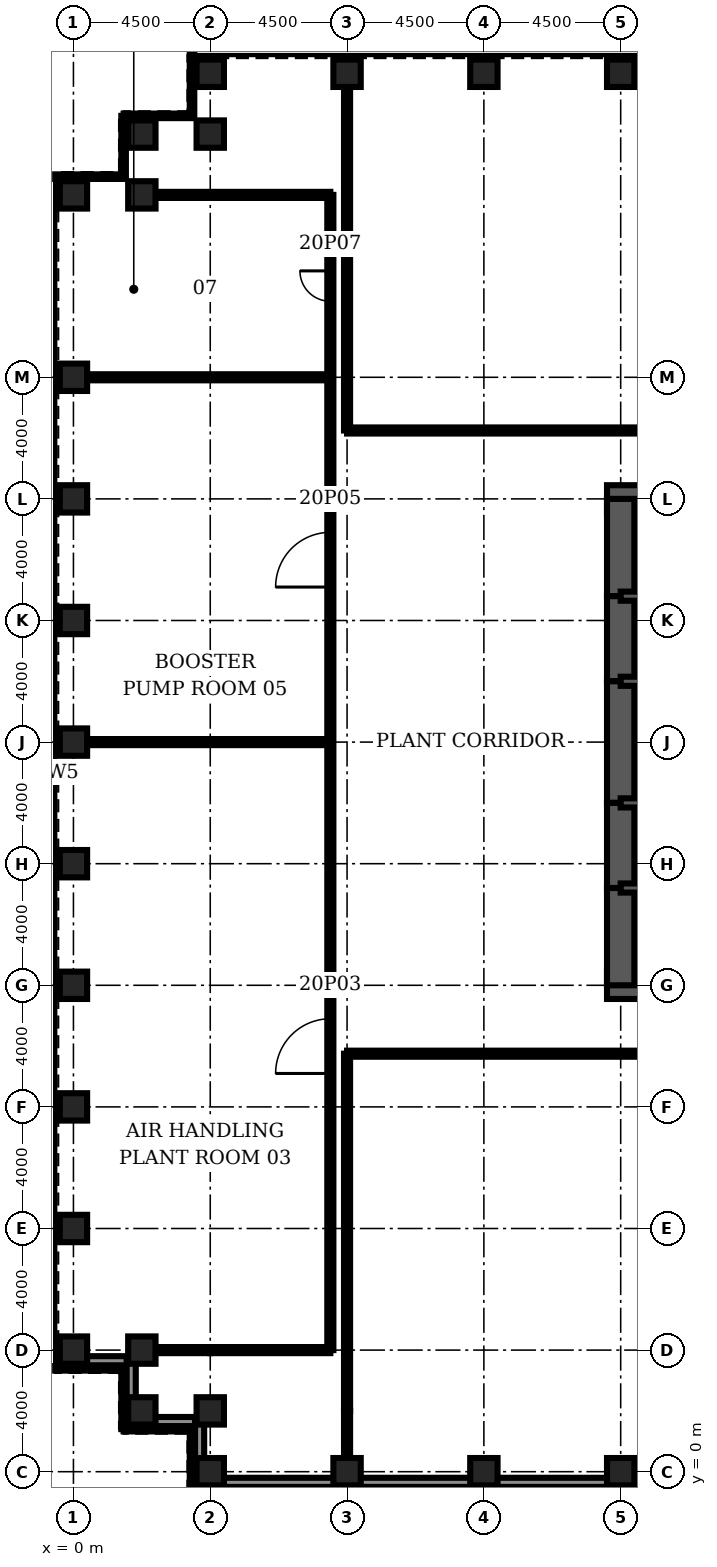
"""IFC4 building model, lengths in metres.
Left out: names, types, materials, properties, quantities, classifications, styles, units other than length and angle.
Written with IfcOpenShell. Run it as: python <this file> out.ifc"""

import sys

from ifc_helpers import new_model, si_unit, direction, frame, frame_2d, origin, origin_2d, place, context, subcontext, project, spatial, rectangle, hollow_rectangle, extrude, element, fill, save


model = new_model("IFC4")
c1 = context("Model", 3, precision=1e-05, world=origin(), true_north=direction((0.0, 1.0)))
c2 = subcontext(c1, "Body", "Model", "MODEL_VIEW")
j1 = project(units=[si_unit("LENGTHUNIT", "METRE"), si_unit("PLANEANGLEUNIT", "RADIAN")], contexts=[c1])
p1 = place(None, origin())
s1 = spatial("IfcSite", under=j1, at=p1, CompositionType="ELEMENT")
p2 = place(p1, origin())
s2 = spatial("IfcBuilding", under=s1, at=p2, CompositionType="ELEMENT")
p3 = place(p2, frame((0.0, 0.0, 95.0)))
s3 = spatial("IfcBuildingStorey", under=s2, at=p3, CompositionType="ELEMENT", Elevation=95.0)
for number, where, z_axis, x_axis in (
    (1, (4.5, 0.056, 0.155), (0.0, 0.342, 0.94), (0.0, -0.94, 0.342)),
    (2, (9.0, 0.056, 0.155), (0.0, 0.342, 0.94), (0.0, -0.94, 0.342)),
    (3, (13.5, 0.056, 0.155), (0.0, 0.342, 0.94), (0.0, -0.94, 0.342)),
    (4, (18.0, 0.056, 0.155), (0.0, 0.342, 0.94), (0.0, -0.94, 0.342)),
):
    element("IfcColumn", number, at=place(p3, frame(where, z_axis=z_axis, x_axis=x_axis)), inside=s3, PredefinedType="USERDEFINED", context=c2, shape_type="SweptSolid", body=[
        extrude(hollow_rectangle(XDim=0.9, YDim=0.9, WallThickness=0.11, at=origin_2d()), origin(), (0.0, 0.0, 1.0), 5.522),
    ])
for number, where, z_axis, x_axis in (
    (5, (18.0, 46.0, 0.0), (0.0, 0.0, 1.0), (0.0, 1.0, 0.0)),
    (6, (13.5, 46.0, 0.0), (0.0, 0.0, 1.0), (0.0, 1.0, 0.0)),
    (7, (9.0, 46.0, 0.0), (0.0, 0.0, 1.0), (0.0, 1.0, 0.0)),
    (8, (4.5, 46.0, 0.0), (0.0, 0.0, 1.0), (0.0, 1.0, 0.0)),
    (9, (4.5, 44.0, 0.0), (0.0, 0.0, 1.0), (0.0, 1.0, 0.0)),
    (10, (2.25, 44.0, 0.0), (0.0, 0.0, 1.0), (1.0, 0.0, 0.0)),
    (11, (2.25, 42.0, 0.0), (0.0, 0.0, 1.0), (1.0, 0.0, 0.0)),
    (12, (0.0, 42.0, 0.0), (0.0, 0.0, 1.0), (1.0, 0.0, 0.0)),
    (13, (0.0, 36.0, 0.0), (0.0, 0.0, 1.0), (1.0, 0.0, 0.0)),
    (14, (0.0, 32.0, 0.0), (0.0, 0.0, 1.0), (1.0, 0.0, 0.0)),
    (15, (0.0, 28.0, 0.0), (0.0, 0.0, 1.0), (1.0, 0.0, 0.0)),
    (16, (0.0, 24.0, 0.0), (0.0, 0.0, 1.0), (1.0, 0.0, 0.0)),
    (17, (0.0, 20.0, 0.0), (0.0, 0.0, 1.0), (1.0, 0.0, 0.0)),
    (18, (0.0, 16.0, 0.0), (0.0, 0.0, 1.0), (1.0, 0.0, 0.0)),
    (19, (0.0, 12.0, 0.0), (0.0, 0.0, 1.0), (1.0, 0.0, 0.0)),
    (20, (0.0, 8.0, 0.0), (0.0, 0.0, 1.0), (1.0, 0.0, 0.0)),
):
    element("IfcColumn", number, at=place(p3, frame(where, z_axis=z_axis, x_axis=x_axis)), inside=s3, PredefinedType="COLUMN", context=c2, shape_type="SweptSolid", body=[
        extrude(hollow_rectangle(XDim=0.9, YDim=0.9, WallThickness=0.11, at=origin_2d()), origin(), (0.0, 0.0, 1.0), 5.5),
    ])
for number, where, z_axis, x_axis in (
    (21, (0.0, 4.056, 0.155), (0.0, 0.342, 0.94), (-1.0, 0.0, 0.0)),
    (22, (2.25, 4.056, 0.155), (0.0, 0.342, 0.94), (-1.0, 0.0, 0.0)),
    (23, (2.25, 2.056, 0.155), (0.0, 0.342, 0.94), (-1.0, 0.0, 0.0)),
    (24, (4.5, 2.056, 0.155), (0.0, 0.342, 0.94), (0.0, -0.94, 0.342)),
):
    element("IfcColumn", number, at=place(p3, frame(where, z_axis=z_axis, x_axis=x_axis)), inside=s3, PredefinedType="USERDEFINED", context=c2, shape_type="SweptSolid", body=[
        extrude(hollow_rectangle(XDim=0.9, YDim=0.9, WallThickness=0.11, at=origin_2d()), origin(), (0.0, 0.0, 1.0), 5.522),
    ])
for number, where, z_axis, x_axis in (
    (25, (17.55, 16.0, 0.0), (0.0, 0.0, 1.0), (1.0, 0.0, 0.0)),
    (26, (27.0, 32.0, 0.0), (0.0, 0.0, 1.0), (-1.0, 0.0, 0.0)),
):
    element("IfcWall", number, at=place(p3, frame(where, z_axis=z_axis, x_axis=x_axis)), inside=s3, PredefinedType="SHEAR", context=c2, shape_type="SweptSolid", body=[
        extrude(rectangle(XDim=9.45, YDim=0.9, at=frame_2d((4.725, 0.0))), origin(), (0.0, 0.0, 1.0), 5.5),
    ])
p4 = place(p3, frame((18.0, 32.0, 0.0), z_axis=(0.0, 0.0, 1.0), x_axis=(0.0, -1.0, 0.0)))
e27 = element("IfcWall", 27, at=p4, inside=s3, PredefinedType="SHEAR", context=c2, shape_type="SweptSolid", body=[
    extrude(rectangle(XDim=3.2, YDim=0.9, at=frame_2d((1.6, 0.0))), origin(), (0.0, 0.0, 1.0), 5.5),
])
p5 = place(p3, frame((18.0, 28.8, 0.0), z_axis=(0.0, 0.0, 1.0), x_axis=(0.0, -1.0, 0.0)))
e28 = element("IfcWall", 28, at=p5, inside=s3, PredefinedType="SHEAR", context=c2, shape_type="SweptSolid", body=[
    extrude(rectangle(XDim=2.8, YDim=0.9, at=frame_2d((1.4, 0.0))), origin(), (0.0, 0.0, 1.0), 5.5),
])
p6 = place(p5, frame((0.4, 0.0, 0.0)))
e29 = element("IfcOpeningElement", 29, at=p6, cuts=e28, PredefinedType="OPENING", context=c2, shape_type="SweptSolid", body=[
    extrude(rectangle(XDim=1.8, YDim=2.1, at=frame_2d((0.9, 1.05))), frame((0.0, 0.46, 0.0), z_axis=(0.0, -1.0, 0.0), x_axis=(1.0, 0.0, 0.0)), (0.0, 0.0, 1.0), 0.92),
])
p7 = place(p3, frame((18.0, 26.0, 0.0), z_axis=(0.0, 0.0, 1.0), x_axis=(0.0, -1.0, 0.0)))
e30 = element("IfcWall", 30, at=p7, inside=s3, PredefinedType="SHEAR", context=c2, shape_type="SweptSolid", body=[
    extrude(rectangle(XDim=4.0, YDim=0.9, at=frame_2d((2.0, 0.0))), origin(), (0.0, 0.0, 1.0), 5.5),
])
p8 = place(p3, frame((18.0, 22.0, 0.0), z_axis=(0.0, 0.0, 1.0), x_axis=(0.0, -1.0, 0.0)))
e31 = element("IfcWall", 31, at=p8, inside=s3, PredefinedType="SHEAR", context=c2, shape_type="SweptSolid", body=[
    extrude(rectangle(XDim=2.8, YDim=0.9, at=frame_2d((1.4, 0.0))), origin(), (0.0, 0.0, 1.0), 5.5),
])
p9 = place(p8, frame((0.6, 0.0, 0.0)))
e32 = element("IfcOpeningElement", 32, at=p9, cuts=e31, PredefinedType="OPENING", context=c2, shape_type="SweptSolid", body=[
    extrude(rectangle(XDim=1.8, YDim=2.1, at=frame_2d((0.9, 1.05))), frame((0.0, 0.46, 0.0), z_axis=(0.0, -1.0, 0.0), x_axis=(1.0, 0.0, 0.0)), (0.0, 0.0, 1.0), 0.92),
])
p10 = place(p3, frame((18.0, 19.2, 0.0), z_axis=(0.0, 0.0, 1.0), x_axis=(0.0, -1.0, 0.0)))
e33 = element("IfcWall", 33, at=p10, inside=s3, PredefinedType="SHEAR", context=c2, shape_type="SweptSolid", body=[
    extrude(rectangle(XDim=3.2, YDim=0.9, at=frame_2d((1.6, 0.0))), origin(), (0.0, 0.0, 1.0), 5.5),
])
p11 = place(p3, frame((18.0, 19.2, 0.0), z_axis=(0.0, 0.0, 1.0), x_axis=(1.0, 0.0, 0.0)))
e34 = element("IfcWall", 34, at=p11, inside=s3, PredefinedType="SOLIDWALL", context=c2, shape_type="SweptSolid", body=[
    extrude(rectangle(XDim=9.0, YDim=0.3, at=frame_2d((4.5, 0.0))), origin(), (0.0, 0.0, 1.0), 5.5),
])
p12 = place(p11, frame((0.65, 0.0, 0.0)))
e35 = element("IfcOpeningElement", 35, at=p12, cuts=e34, PredefinedType="OPENING", context=c2, shape_type="SweptSolid", body=[
    extrude(rectangle(XDim=1.0, YDim=2.1, at=frame_2d((0.5, 1.05))), frame((0.0, 0.16, 0.0), z_axis=(0.0, -1.0, 0.0), x_axis=(1.0, 0.0, 0.0)), (0.0, 0.0, 1.0), 0.32),
])
p13 = place(p3, frame((18.0, 28.8, 0.0), z_axis=(0.0, 0.0, 1.0), x_axis=(1.0, 0.0, 0.0)))
e36 = element("IfcWall", 36, at=p13, inside=s3, PredefinedType="SOLIDWALL", context=c2, shape_type="SweptSolid", body=[
    extrude(rectangle(XDim=9.0, YDim=0.3, at=frame_2d((4.5, 0.0))), origin(), (0.0, 0.0, 1.0), 5.5),
])
p14 = place(p13, frame((0.65, 0.0, 0.0)))
e37 = element("IfcOpeningElement", 37, at=p14, cuts=e36, PredefinedType="OPENING", context=c2, shape_type="SweptSolid", body=[
    extrude(rectangle(XDim=1.0, YDim=2.1, at=frame_2d((0.5, 1.05))), frame((0.0, 0.16, 0.0), z_axis=(0.0, -1.0, 0.0), x_axis=(1.0, 0.0, 0.0)), (0.0, 0.0, 1.0), 0.32),
])
p15 = place(p3, frame((18.0, 22.0, 0.0), z_axis=(0.0, 0.0, 1.0), x_axis=(1.0, 0.0, 0.0)))
e38 = element("IfcWall", 38, at=p15, inside=s3, PredefinedType="SOLIDWALL", context=c2, shape_type="SweptSolid", body=[
    extrude(rectangle(XDim=6.0, YDim=0.3, at=frame_2d((3.0, 0.0))), origin(), (0.0, 0.0, 1.0), 5.5),
])
p16 = place(p15, frame((2.0, 0.0, 0.0)))
e39 = element("IfcOpeningElement", 39, at=p16, cuts=e38, PredefinedType="OPENING", context=c2, shape_type="SweptSolid", body=[
    extrude(rectangle(XDim=1.0, YDim=2.1, at=frame_2d((0.5, 1.05))), frame((0.0, 0.16, 0.0), z_axis=(0.0, -1.0, 0.0), x_axis=(1.0, 0.0, 0.0)), (0.0, 0.0, 1.0), 0.32),
])
p17 = place(p3, frame((18.0, 26.0, 0.0), z_axis=(0.0, 0.0, 1.0), x_axis=(1.0, 0.0, 0.0)))
e40 = element("IfcWall", 40, at=p17, inside=s3, PredefinedType="SOLIDWALL", context=c2, shape_type="SweptSolid", body=[
    extrude(rectangle(XDim=6.0, YDim=0.3, at=frame_2d((3.0, 0.0))), origin(), (0.0, 0.0, 1.0), 5.5),
])
p18 = place(p3, frame((2.7, 4.0, 0.0), z_axis=(0.0, 0.0, 1.0), x_axis=(1.0, 0.0, 0.0)))
e41 = element("IfcWall", 41, at=p18, inside=s3, PredefinedType="PARTITIONING", context=c2, shape_type="SweptSolid", body=[
    extrude(rectangle(XDim=1.8, YDim=0.2, at=frame_2d((0.9, 0.0))), origin(), (0.0, 0.0, 1.0), 4.64),
])
p19 = place(p3, frame((4.5, 4.0, 0.0), z_axis=(0.0, 0.0, 1.0), x_axis=(1.0, 0.0, 0.0)))
e42 = element("IfcWall", 42, at=p19, inside=s3, PredefinedType="PARTITIONING", context=c2, shape_type="SweptSolid", body=[
    extrude(rectangle(XDim=3.95, YDim=0.2, at=frame_2d((1.975, 0.0))), origin(), (0.0, 0.0, 1.0), 5.34),
])
p20 = place(p3, frame((9.0, 13.75, 0.0), z_axis=(0.0, 0.0, 1.0), x_axis=(1.0, 0.0, 0.0)))
e43 = element("IfcWall", 43, at=p20, inside=s3, PredefinedType="PARTITIONING", context=c2, shape_type="SweptSolid", body=[
    extrude(rectangle(XDim=54.0, YDim=0.2, at=frame_2d((27.0, 0.0))), origin(), (0.0, 0.0, 1.0), 5.34),
])
p21 = place(p20, frame((26.1, 0.0, 0.0)))
e44 = element("IfcOpeningElement", 44, at=p21, cuts=e43, PredefinedType="OPENING", context=c2, shape_type="SweptSolid", body=[
    extrude(rectangle(XDim=1.8, YDim=2.1, at=frame_2d((0.9, 1.05))), frame((0.0, 0.11, 0.0), z_axis=(0.0, -1.0, 0.0), x_axis=(1.0, 0.0, 0.0)), (0.0, 0.0, 1.0), 0.22),
])
p22 = place(p3, frame((0.45, 24.0, 0.0), z_axis=(0.0, 0.0, 1.0), x_axis=(1.0, 0.0, 0.0)))
e45 = element("IfcWall", 45, at=p22, inside=s3, PredefinedType="PARTITIONING", context=c2, shape_type="SweptSolid", body=[
    extrude(rectangle(XDim=8.0, YDim=0.2, at=frame_2d((4.0, 0.0))), origin(), (0.0, 0.0, 1.0), 5.34),
])
p23 = place(p3, frame((9.0, 34.25, 0.0), z_axis=(0.0, 0.0, 1.0), x_axis=(1.0, 0.0, 0.0)))
e46 = element("IfcWall", 46, at=p23, inside=s3, PredefinedType="PARTITIONING", context=c2, shape_type="SweptSolid", body=[
    extrude(rectangle(XDim=54.0, YDim=0.2, at=frame_2d((27.0, 0.0))), origin(), (0.0, 0.0, 1.0), 5.34),
])
p24 = place(p23, frame((26.1, 0.0, 0.0)))
e47 = element("IfcOpeningElement", 47, at=p24, cuts=e46, PredefinedType="OPENING", context=c2, shape_type="SweptSolid", body=[
    extrude(rectangle(XDim=1.8, YDim=2.1, at=frame_2d((0.9, 1.05))), frame((0.0, 0.11, 0.0), z_axis=(0.0, -1.0, 0.0), x_axis=(1.0, 0.0, 0.0)), (0.0, 0.0, 1.0), 0.22),
])
p25 = place(p3, frame((0.45, 36.0, 0.0), z_axis=(0.0, 0.0, 1.0), x_axis=(1.0, 0.0, 0.0)))
e48 = element("IfcWall", 48, at=p25, inside=s3, PredefinedType="PARTITIONING", context=c2, shape_type="SweptSolid", body=[
    extrude(rectangle(XDim=8.0, YDim=0.2, at=frame_2d((4.0, 0.0))), origin(), (0.0, 0.0, 1.0), 5.34),
])
p26 = place(p3, frame((2.7, 42.0, 0.0), z_axis=(0.0, 0.0, 1.0), x_axis=(1.0, 0.0, 0.0)))
e49 = element("IfcWall", 49, at=p26, inside=s3, PredefinedType="PARTITIONING", context=c2, shape_type="SweptSolid", body=[
    extrude(rectangle(XDim=5.75, YDim=0.2, at=frame_2d((2.875, 0.0))), origin(), (0.0, 0.0, 1.0), 5.34),
])
p27 = place(p3, frame((8.45, 4.0, 0.0), z_axis=(0.0, 0.0, 1.0), x_axis=(0.0, 1.0, 0.0)))
e50 = element("IfcWall", 50, at=p27, inside=s3, PredefinedType="PARTITIONING", context=c2, shape_type="SweptSolid", body=[
    extrude(rectangle(XDim=38.0, YDim=0.2, at=frame_2d((19.0, 0.0))), origin(), (0.0, 0.0, 1.0), 5.34),
])
p28 = place(p27, frame((9.1, 0.0, 0.0)))
e51 = element("IfcOpeningElement", 51, at=p28, cuts=e50, PredefinedType="OPENING", context=c2, shape_type="SweptSolid", body=[
    extrude(rectangle(XDim=1.8, YDim=2.1, at=frame_2d((0.9, 1.05))), frame((0.0, 0.11, 0.0), z_axis=(0.0, -1.0, 0.0), x_axis=(1.0, 0.0, 0.0)), (0.0, 0.0, 1.0), 0.22),
])
p29 = place(p27, frame((25.1, 0.0, 0.0)))
e52 = element("IfcOpeningElement", 52, at=p29, cuts=e50, PredefinedType="OPENING", context=c2, shape_type="SweptSolid", body=[
    extrude(rectangle(XDim=1.8, YDim=2.1, at=frame_2d((0.9, 1.05))), frame((0.0, 0.11, 0.0), z_axis=(0.0, -1.0, 0.0), x_axis=(1.0, 0.0, 0.0)), (0.0, 0.0, 1.0), 0.22),
])
p30 = place(p27, frame((34.5, 0.0, 0.0)))
e53 = element("IfcOpeningElement", 53, at=p30, cuts=e50, PredefinedType="OPENING", context=c2, shape_type="SweptSolid", body=[
    extrude(rectangle(XDim=1.0, YDim=2.1, at=frame_2d((0.5, 1.05))), frame((0.0, 0.11, 0.0), z_axis=(0.0, -1.0, 0.0), x_axis=(1.0, 0.0, 0.0)), (0.0, 0.0, 1.0), 0.22),
])
p31 = place(p3, frame((9.0, 0.45, 0.0), z_axis=(0.0, 0.0, 1.0), x_axis=(0.0, 1.0, 0.0)))
e54 = element("IfcWall", 54, at=p31, inside=s3, PredefinedType="PARTITIONING", context=c2, shape_type="SweptSolid", body=[
    extrude(rectangle(XDim=1.55, YDim=0.2, at=frame_2d((0.775, 0.0))), origin(), (0.0, 0.0, 1.0), 4.726),
])
p32 = place(p3, frame((9.0, 2.0, 0.0), z_axis=(0.0, 0.0, 1.0), x_axis=(0.0, 1.0, 0.0)))
e55 = element("IfcWall", 55, at=p32, inside=s3, PredefinedType="PARTITIONING", context=c2, shape_type="SweptSolid", body=[
    extrude(rectangle(XDim=11.75, YDim=0.2, at=frame_2d((5.875, 0.0))), origin(), (0.0, 0.0, 1.0), 5.25),
])
p33 = place(p3, frame((9.0, 34.25, 0.0), z_axis=(0.0, 0.0, 1.0), x_axis=(0.0, 1.0, 0.0)))
e56 = element("IfcWall", 56, at=p33, inside=s3, PredefinedType="PARTITIONING", context=c2, shape_type="SweptSolid", body=[
    extrude(rectangle(XDim=11.3, YDim=0.2, at=frame_2d((5.65, 0.0))), origin(), (0.0, 0.0, 1.0), 5.34),
])
p34 = place(p3, frame((3.9, 46.6, 0.0), z_axis=(0.0, 0.0, 1.0), x_axis=(0.0, -1.0, 0.0)))
e57 = element("IfcWall", 57, at=p34, inside=s3, PredefinedType="ELEMENTEDWALL", context=c2, shape_type="SweptSolid", body=[
    extrude(rectangle(XDim=2.0, YDim=0.15, at=frame_2d((1.0, 0.0))), origin(), (0.0, 0.0, 1.0), 5.34),
])
p35 = place(p3, frame((3.9, 44.6, 0.0), z_axis=(0.0, 0.0, 1.0), x_axis=(-1.0, 0.0, 0.0)))
e58 = element("IfcWall", 58, at=p35, inside=s3, PredefinedType="ELEMENTEDWALL", context=c2, shape_type="SweptSolid", body=[
    extrude(rectangle(XDim=2.25, YDim=0.15, at=frame_2d((1.125, 0.0))), origin(), (0.0, 0.0, 1.0), 5.34),
])
p36 = place(p3, frame((1.65, 44.6, 0.0), z_axis=(0.0, 0.0, 1.0), x_axis=(0.0, -1.0, 0.0)))
e59 = element("IfcWall", 59, at=p36, inside=s3, PredefinedType="ELEMENTEDWALL", context=c2, shape_type="SweptSolid", body=[
    extrude(rectangle(XDim=2.0, YDim=0.15, at=frame_2d((1.0, 0.0))), origin(), (0.0, 0.0, 1.0), 5.34),
])
for number, where, z_axis, x_axis in (
    (60, (1.65, 42.6, 0.0), (0.0, 0.0, 1.0), (-1.0, 0.0, 0.0)),
    (61, (-0.6, 3.4, 0.0), (0.0, 0.0, 1.0), (1.0, 0.0, 0.0)),
):
    element("IfcWall", number, at=place(p3, frame(where, z_axis=z_axis, x_axis=x_axis)), inside=s3, PredefinedType="ELEMENTEDWALL", context=c2, shape_type="SweptSolid", body=[
        extrude(rectangle(XDim=2.25, YDim=0.15, at=frame_2d((1.125, 0.0))), origin(), (0.0, 0.0, 1.0), 5.34),
    ])
p37 = place(p3, frame((1.65, 3.4, 0.0), z_axis=(0.0, 0.0, 1.0), x_axis=(0.0, -1.0, 0.0)))
e62 = element("IfcWall", 62, at=p37, inside=s3, PredefinedType="ELEMENTEDWALL", context=c2, shape_type="SweptSolid", body=[
    extrude(rectangle(XDim=2.0, YDim=0.15, at=frame_2d((1.0, 0.0))), origin(), (0.0, 0.0, 1.0), 5.34),
])
p38 = place(p3, frame((1.65, 1.4, 0.0), z_axis=(0.0, 0.0, 1.0), x_axis=(1.0, 0.0, 0.0)))
e63 = element("IfcWall", 63, at=p38, inside=s3, PredefinedType="ELEMENTEDWALL", context=c2, shape_type="SweptSolid", body=[
    extrude(rectangle(XDim=2.25, YDim=0.15, at=frame_2d((1.125, 0.0))), origin(), (0.0, 0.0, 1.0), 5.34),
])
p39 = place(p3, frame((3.9, 1.4, 0.0), z_axis=(0.0, 0.0, 1.0), x_axis=(0.0, -1.0, 0.0)))
e64 = element("IfcWall", 64, at=p39, inside=s3, PredefinedType="ELEMENTEDWALL", context=c2, shape_type="SweptSolid", body=[
    extrude(rectangle(XDim=2.0, YDim=0.15, at=frame_2d((1.0, 0.0))), origin(), (0.0, 0.0, 1.0), 5.34),
])
p40 = place(p3, frame((4.15, -0.35, 5.5), z_axis=(0.0, 0.0, 1.0), x_axis=(1.0, 0.0, 0.0)))
e65 = element("IfcWall", 65, at=p40, inside=s3, PredefinedType="PARAPET", context=c2, shape_type="SweptSolid", body=[
    extrude(rectangle(XDim=63.7, YDim=0.3, at=frame_2d((31.85, 0.0))), origin(), (0.0, 0.0, 1.0), 1.1),
])
p41 = place(p3, frame((-0.35, 3.65, 5.5), z_axis=(0.0, 0.0, 1.0), x_axis=(1.0, 0.0, 0.0)))
e66 = element("IfcWall", 66, at=p41, inside=s3, PredefinedType="PARAPET", context=c2, shape_type="SweptSolid", body=[
    extrude(rectangle(XDim=2.25, YDim=0.3, at=frame_2d((1.125, 0.0))), origin(), (0.0, 0.0, 1.0), 1.1),
])
p42 = place(p3, frame((1.9, 3.65, 5.5), z_axis=(0.0, 0.0, 1.0), x_axis=(0.0, -1.0, 0.0)))
e67 = element("IfcWall", 67, at=p42, inside=s3, PredefinedType="PARAPET", context=c2, shape_type="SweptSolid", body=[
    extrude(rectangle(XDim=2.0, YDim=0.3, at=frame_2d((1.0, 0.0))), origin(), (0.0, 0.0, 1.0), 1.1),
])
p43 = place(p3, frame((1.9, 1.65, 5.5), z_axis=(0.0, 0.0, 1.0), x_axis=(1.0, 0.0, 0.0)))
e68 = element("IfcWall", 68, at=p43, inside=s3, PredefinedType="PARAPET", context=c2, shape_type="SweptSolid", body=[
    extrude(rectangle(XDim=2.25, YDim=0.3, at=frame_2d((1.125, 0.0))), origin(), (0.0, 0.0, 1.0), 1.1),
])
p44 = place(p3, frame((4.15, 1.65, 5.5), z_axis=(0.0, 0.0, 1.0), x_axis=(0.0, -1.0, 0.0)))
e69 = element("IfcWall", 69, at=p44, inside=s3, PredefinedType="PARAPET", context=c2, shape_type="SweptSolid", body=[
    extrude(rectangle(XDim=2.0, YDim=0.3, at=frame_2d((1.0, 0.0))), origin(), (0.0, 0.0, 1.0), 1.1),
])
p45 = place(p28, origin())
e70 = element("IfcDoor", 70, at=p45, inside=s3, OperationType="SINGLE_SWING_LEFT", PredefinedType="DOOR", context=c2, shape_type="SweptSolid", body=[
    extrude(rectangle(XDim=1.8, YDim=2.1, at=frame_2d((0.9, 1.05))), frame((0.0, 0.025, 0.0), z_axis=(0.0, -1.0, 0.0), x_axis=(1.0, 0.0, 0.0)), (0.0, 0.0, 1.0), 0.05),
])
fill(e51, e70)
p46 = place(p29, origin())
e71 = element("IfcDoor", 71, at=p46, inside=s3, OperationType="SINGLE_SWING_LEFT", PredefinedType="DOOR", context=c2, shape_type="SweptSolid", body=[
    extrude(rectangle(XDim=1.8, YDim=2.1, at=frame_2d((0.9, 1.05))), frame((0.0, 0.025, 0.0), z_axis=(0.0, -1.0, 0.0), x_axis=(1.0, 0.0, 0.0)), (0.0, 0.0, 1.0), 0.05),
])
fill(e52, e71)
p47 = place(p30, origin())
e72 = element("IfcDoor", 72, at=p47, inside=s3, OperationType="SINGLE_SWING_RIGHT", PredefinedType="DOOR", context=c2, shape_type="SweptSolid", body=[
    extrude(rectangle(XDim=1.0, YDim=2.1, at=frame_2d((0.5, 1.05))), frame((0.0, 0.025, 0.0), z_axis=(0.0, -1.0, 0.0), x_axis=(1.0, 0.0, 0.0)), (0.0, 0.0, 1.0), 0.05),
])
fill(e53, e72)
p48 = place(p9, origin())
e73 = element("IfcDoor", 73, at=p48, inside=s3, OperationType="SINGLE_SWING_LEFT", PredefinedType="DOOR", context=c2, shape_type="SweptSolid", body=[
    extrude(rectangle(XDim=1.8, YDim=2.1, at=frame_2d((0.9, 1.05))), frame((0.0, 0.45, 0.0), z_axis=(0.0, -1.0, 0.0), x_axis=(1.0, 0.0, 0.0)), (0.0, 0.0, 1.0), 0.899),
])
fill(e32, e73)
p49 = place(p6, origin())
e74 = element("IfcDoor", 74, at=p49, inside=s3, OperationType="SINGLE_SWING_LEFT", PredefinedType="DOOR", context=c2, shape_type="SweptSolid", body=[
    extrude(rectangle(XDim=1.8, YDim=2.1, at=frame_2d((0.9, 1.05))), frame((0.0, 0.45, 0.0), z_axis=(0.0, -1.0, 0.0), x_axis=(1.0, 0.0, 0.0)), (0.0, 0.0, 1.0), 0.899),
])
fill(e29, e74)
save(model, sys.argv[1])
